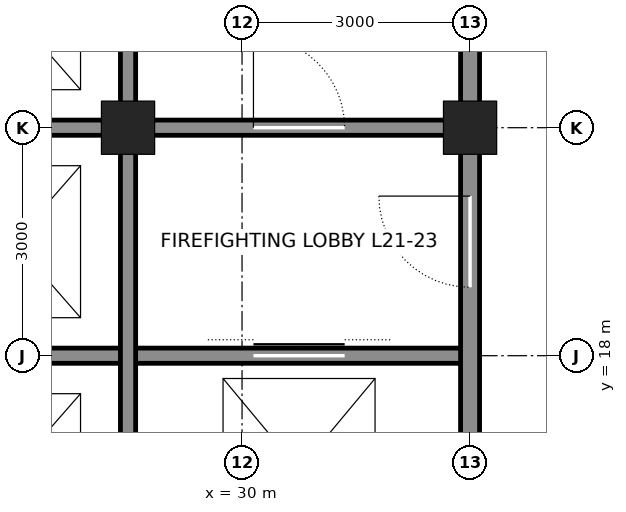
"""IFC4 building model, lengths in metres.
Left out: names, types, materials, properties, quantities, classifications, styles, units other than length and angle.
Written with IfcOpenShell. Run it as: python <this file> out.ifc"""

import sys

from ifc_helpers import new_model, si_unit, direction, frame, frame_2d, origin, origin_2d, place, context, subcontext, project, spatial, rectangle, hollow_rectangle, extrude, element, fill, save


model = new_model("IFC4")
c1 = context("Model", 3, precision=1e-05, world=origin(), true_north=direction((0.0, 1.0)))
c2 = subcontext(c1, "Body", "Model", "MODEL_VIEW")
j1 = project(units=[si_unit("LENGTHUNIT", "METRE"), si_unit("PLANEANGLEUNIT", "RADIAN")], contexts=[c1])
p1 = place(None, origin())
s1 = spatial("IfcSite", under=j1, at=p1, CompositionType="ELEMENT")
p2 = place(p1, origin())
s2 = spatial("IfcBuilding", under=s1, at=p2, CompositionType="ELEMENT")
p3 = place(p2, frame((0.0, 0.0, 102.3)))
s3 = spatial("IfcBuildingStorey", under=s2, at=p3, CompositionType="ELEMENT", Elevation=102.3)
for number, where, z_axis, x_axis in (
    (1, (33.0, 21.0, 0.0), (0.0, 0.0, 1.0), (1.0, 0.0, 0.0)),
    (2, (28.5, 21.0, 0.0), (0.0, 0.0, 1.0), (1.0, 0.0, 0.0)),
):
    element("IfcColumn", number, at=place(p3, frame(where, z_axis=z_axis, x_axis=x_axis)), inside=s3, PredefinedType="COLUMN", context=c2, shape_type="SweptSolid", body=[
        extrude(hollow_rectangle(XDim=0.7, YDim=0.7, WallThickness=0.07, at=origin_2d()), origin(), (0.0, 0.0, 1.0), 4.5),
    ])
p4 = place(p3, frame((25.5, 18.0, 0.0), z_axis=(0.0, 0.0, 1.0), x_axis=(1.0, 0.0, 0.0)))
e3 = element("IfcWall", 3, at=p4, inside=s3, PredefinedType="SOLIDWALL", context=c2, shape_type="SweptSolid", body=[
    extrude(rectangle(XDim=7.5, YDim=0.2, at=frame_2d((3.75, 0.0))), origin(), (0.0, 0.0, 1.0), 4.34),
])
p5 = place(p4, frame((4.65, 0.0, 0.0)))
e4 = element("IfcOpeningElement", 4, at=p5, cuts=e3, PredefinedType="OPENING", context=c2, shape_type="SweptSolid", body=[
    extrude(rectangle(XDim=1.2, YDim=2.1, at=frame_2d((0.6, 1.05))), frame((0.0, 0.11, 0.0), z_axis=(0.0, -1.0, 0.0), x_axis=(1.0, 0.0, 0.0)), (0.0, 0.0, 1.0), 0.22),
])
p6 = place(p3, frame((25.5, 21.0, 0.0), z_axis=(0.0, 0.0, 1.0), x_axis=(1.0, 0.0, 0.0)))
e5 = element("IfcWall", 5, at=p6, inside=s3, PredefinedType="SOLIDWALL", context=c2, shape_type="SweptSolid", body=[
    extrude(rectangle(XDim=2.75, YDim=0.2, at=frame_2d((1.375, 0.0))), origin(), (0.0, 0.0, 1.0), 3.39),
])
p7 = place(p3, frame((28.75, 21.0, 0.0), z_axis=(0.0, 0.0, 1.0), x_axis=(1.0, 0.0, 0.0)))
e6 = element("IfcWall", 6, at=p7, inside=s3, PredefinedType="SOLIDWALL", context=c2, shape_type="SweptSolid", body=[
    extrude(rectangle(XDim=4.0, YDim=0.2, at=frame_2d((2.0, 0.0))), origin(), (0.0, 0.0, 1.0), 3.39),
])
p8 = place(p7, frame((1.4, 0.0, 0.0)))
e7 = element("IfcOpeningElement", 7, at=p8, cuts=e6, PredefinedType="OPENING", context=c2, shape_type="SweptSolid", body=[
    extrude(rectangle(XDim=1.2, YDim=2.1, at=frame_2d((0.6, 1.05))), frame((0.0, 0.11, 0.0), z_axis=(0.0, -1.0, 0.0), x_axis=(1.0, 0.0, 0.0)), (0.0, 0.0, 1.0), 0.22),
])
p9 = place(p3, frame((28.5, 12.25, 0.0), z_axis=(0.0, 0.0, 1.0), x_axis=(0.0, 1.0, 0.0)))
e8 = element("IfcWall", 8, at=p9, inside=s3, PredefinedType="SOLIDWALL", context=c2, shape_type="SweptSolid", body=[
    extrude(rectangle(XDim=8.5, YDim=0.2, at=frame_2d((4.25, 0.0))), origin(), (0.0, 0.0, 1.0), 3.413),
])
p10 = place(p3, frame((28.5, 21.25, 0.0), z_axis=(0.0, 0.0, 1.0), x_axis=(0.0, 1.0, 0.0)))
e9 = element("IfcWall", 9, at=p10, inside=s3, PredefinedType="SOLIDWALL", context=c2, shape_type="SweptSolid", body=[
    extrude(rectangle(XDim=2.5, YDim=0.2, at=frame_2d((1.25, 0.0))), origin(), (0.0, 0.0, 1.0), 3.413),
])
p11 = place(p3, frame((33.0, 12.25, 0.0), z_axis=(0.0, 0.0, 1.0), x_axis=(0.0, 1.0, 0.0)))
e10 = element("IfcWall", 10, at=p11, inside=s3, PredefinedType="SOLIDWALL", context=c2, shape_type="SweptSolid", body=[
    extrude(rectangle(XDim=8.5, YDim=0.25, at=frame_2d((4.25, 0.0))), origin(), (0.0, 0.0, 1.0), 3.413),
])
p12 = place(p11, frame((6.65, 0.0, 0.0)))
e11 = element("IfcOpeningElement", 11, at=p12, cuts=e10, PredefinedType="OPENING", context=c2, shape_type="SweptSolid", body=[
    extrude(rectangle(XDim=1.2, YDim=2.1, at=frame_2d((0.6, 1.05))), frame((0.0, 0.135, 0.0), z_axis=(0.0, -1.0, 0.0), x_axis=(1.0, 0.0, 0.0)), (0.0, 0.0, 1.0), 0.27),
])
p13 = place(p11, frame((0.875, 0.0, 0.0)))
e12 = element("IfcOpeningElement", 12, at=p13, cuts=e10, PredefinedType="OPENING", context=c2, shape_type="SweptSolid", body=[
    extrude(rectangle(XDim=0.75, YDim=2.1, at=frame_2d((0.375, 1.05))), frame((0.0, 0.135, 0.0), z_axis=(0.0, -1.0, 0.0), x_axis=(1.0, 0.0, 0.0)), (0.0, 0.0, 1.0), 0.27),
])
p14 = place(p3, frame((33.0, 21.25, 0.0), z_axis=(0.0, 0.0, 1.0), x_axis=(0.0, 1.0, 0.0)))
e13 = element("IfcWall", 13, at=p14, inside=s3, PredefinedType="SOLIDWALL", context=c2, shape_type="SweptSolid", body=[
    extrude(rectangle(XDim=2.5, YDim=0.25, at=frame_2d((1.25, 0.0))), origin(), (0.0, 0.0, 1.0), 3.413),
])
p15 = place(p8, origin())
e14 = element("IfcDoor", 14, at=p15, inside=s3, OperationType="SINGLE_SWING_LEFT", PredefinedType="DOOR", context=c2, shape_type="SweptSolid", body=[
    extrude(rectangle(XDim=1.2, YDim=2.1, at=frame_2d((0.6, 1.05))), frame((0.0, 0.025, 0.0), z_axis=(0.0, -1.0, 0.0), x_axis=(1.0, 0.0, 0.0)), (0.0, 0.0, 1.0), 0.05),
])
fill(e7, e14)
p16 = place(p12, origin())
e15 = element("IfcDoor", 15, at=p16, inside=s3, OperationType="SINGLE_SWING_RIGHT", PredefinedType="DOOR", context=c2, shape_type="SweptSolid", body=[
    extrude(rectangle(XDim=1.2, YDim=2.1, at=frame_2d((0.6, 1.05))), frame((0.0, 0.025, 0.0), z_axis=(0.0, -1.0, 0.0), x_axis=(1.0, 0.0, 0.0)), (0.0, 0.0, 1.0), 0.05),
])
fill(e11, e15)
p17 = place(p5, origin())
e16 = element("IfcDoor", 16, at=p17, inside=s3, OperationType="DOUBLE_DOOR_SLIDING", PredefinedType="DOOR", context=c2, shape_type="SweptSolid", body=[
    extrude(rectangle(XDim=1.2, YDim=2.1, at=frame_2d((0.6, 1.05))), frame((0.0, 0.025, 0.0), z_axis=(0.0, -1.0, 0.0), x_axis=(1.0, 0.0, 0.0)), (0.0, 0.0, 1.0), 0.05),
])
fill(e4, e16)
save(model, sys.argv[1])
